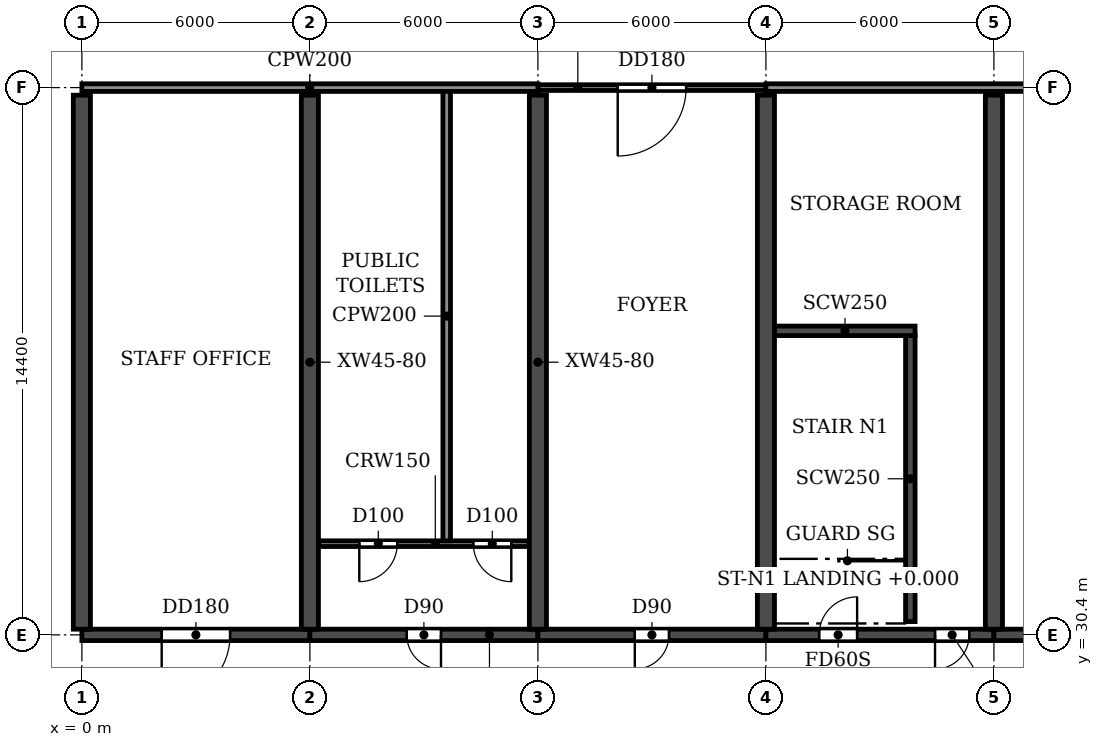
"""IFC4 building model, lengths in metres.
Left out: names, types, materials, properties, quantities, classifications, styles, units other than length and angle.
Written with IfcOpenShell. Run it as: python <this file> out.ifc"""

import sys

from ifc_helpers import new_model, si_unit, direction, frame, frame_2d, origin, place, context, subcontext, project, spatial, rectangle, extrude, element, fill, save


model = new_model("IFC4")
c1 = context("Model", 3, precision=1e-05, world=origin(), true_north=direction((0.0, 1.0)))
c2 = subcontext(c1, "Body", "Model", "MODEL_VIEW")
j1 = project(units=[si_unit("LENGTHUNIT", "METRE"), si_unit("PLANEANGLEUNIT", "RADIAN")], contexts=[c1])
p1 = place(None, origin())
s1 = spatial("IfcSite", under=j1, at=p1, CompositionType="ELEMENT")
p2 = place(p1, origin())
s2 = spatial("IfcBuilding", under=s1, at=p2, CompositionType="ELEMENT")
p3 = place(p2, frame((0.0, 0.0, 19.2)))
s3 = spatial("IfcBuildingStorey", under=s2, at=p3, CompositionType="ELEMENT", Elevation=19.2)
for number, where, z_axis, x_axis in (
    (1, (0.0, 30.55, 0.0), (0.0, 0.0, 1.0), (0.0, 1.0, 0.0)),
    (2, (6.0, 30.55, 0.0), (0.0, 0.0, 1.0), (0.0, 1.0, 0.0)),
    (3, (12.0, 30.55, 0.0), (0.0, 0.0, 1.0), (0.0, 1.0, 0.0)),
    (4, (18.0, 30.55, 0.0), (0.0, 0.0, 1.0), (0.0, 1.0, 0.0)),
    (5, (24.0, 30.55, 0.0), (0.0, 0.0, 1.0), (0.0, 1.0, 0.0)),
):
    element("IfcWall", number, at=place(p3, frame(where, z_axis=z_axis, x_axis=x_axis)), inside=s3, PredefinedType="SHEAR", context=c2, shape_type="SweptSolid", body=[
        extrude(rectangle(XDim=14.05, YDim=0.45, at=frame_2d((7.025, 0.0))), origin(), (0.0, 0.0, 1.0), 3.95),
    ])
p4 = place(p3, frame((0.0, 30.4, 0.0), z_axis=(0.0, 0.0, 1.0), x_axis=(1.0, 0.0, 0.0)))
e6 = element("IfcWall", 6, at=p4, inside=s3, PredefinedType="SHEAR", context=c2, shape_type="SweptSolid", body=[
    extrude(rectangle(XDim=6.0, YDim=0.3, at=frame_2d((3.0, 0.0))), origin(), (0.0, 0.0, 1.0), 3.35),
])
p5 = place(p4, frame((2.1, 0.0, 0.0)))
e7 = element("IfcOpeningElement", 7, at=p5, cuts=e6, PredefinedType="OPENING", context=c2, shape_type="SweptSolid", body=[
    extrude(rectangle(XDim=1.8, YDim=2.1, at=frame_2d((0.9, 1.05))), frame((0.0, 0.16, 0.0), z_axis=(0.0, -1.0, 0.0), x_axis=(1.0, 0.0, 0.0)), (0.0, 0.0, 1.0), 0.32),
])
p6 = place(p3, frame((6.0, 30.4, 0.0), z_axis=(0.0, 0.0, 1.0), x_axis=(1.0, 0.0, 0.0)))
e8 = element("IfcWall", 8, at=p6, inside=s3, PredefinedType="SHEAR", context=c2, shape_type="SweptSolid", body=[
    extrude(rectangle(XDim=6.0, YDim=0.3, at=frame_2d((3.0, 0.0))), origin(), (0.0, 0.0, 1.0), 3.35),
])
p7 = place(p6, frame((2.55, 0.0, 0.0)))
e9 = element("IfcOpeningElement", 9, at=p7, cuts=e8, PredefinedType="OPENING", context=c2, shape_type="SweptSolid", body=[
    extrude(rectangle(XDim=0.9, YDim=2.1, at=frame_2d((0.45, 1.05))), frame((0.0, 0.16, 0.0), z_axis=(0.0, -1.0, 0.0), x_axis=(1.0, 0.0, 0.0)), (0.0, 0.0, 1.0), 0.32),
])
p8 = place(p3, frame((12.0, 30.4, 0.0), z_axis=(0.0, 0.0, 1.0), x_axis=(1.0, 0.0, 0.0)))
e10 = element("IfcWall", 10, at=p8, inside=s3, PredefinedType="SHEAR", context=c2, shape_type="SweptSolid", body=[
    extrude(rectangle(XDim=6.0, YDim=0.3, at=frame_2d((3.0, 0.0))), origin(), (0.0, 0.0, 1.0), 3.35),
])
p9 = place(p8, frame((2.55, 0.0, 0.0)))
e11 = element("IfcOpeningElement", 11, at=p9, cuts=e10, PredefinedType="OPENING", context=c2, shape_type="SweptSolid", body=[
    extrude(rectangle(XDim=0.9, YDim=2.1, at=frame_2d((0.45, 1.05))), frame((0.0, 0.16, 0.0), z_axis=(0.0, -1.0, 0.0), x_axis=(1.0, 0.0, 0.0)), (0.0, 0.0, 1.0), 0.32),
])
p10 = place(p3, frame((18.0, 30.4, 0.0), z_axis=(0.0, 0.0, 1.0), x_axis=(1.0, 0.0, 0.0)))
e12 = element("IfcWall", 12, at=p10, inside=s3, PredefinedType="SHEAR", context=c2, shape_type="SweptSolid", body=[
    extrude(rectangle(XDim=6.0, YDim=0.3, at=frame_2d((3.0, 0.0))), origin(), (0.0, 0.0, 1.0), 3.35),
])
p11 = place(p10, frame((1.4, 0.0, 0.0)))
e13 = element("IfcOpeningElement", 13, at=p11, cuts=e12, PredefinedType="OPENING", context=c2, shape_type="SweptSolid", body=[
    extrude(rectangle(XDim=1.0, YDim=2.1, at=frame_2d((0.5, 1.05))), frame((0.0, 0.16, 0.0), z_axis=(0.0, -1.0, 0.0), x_axis=(1.0, 0.0, 0.0)), (0.0, 0.0, 1.0), 0.32),
])
p12 = place(p10, frame((4.45, 0.0, 0.0)))
e14 = element("IfcOpeningElement", 14, at=p12, cuts=e12, PredefinedType="OPENING", context=c2, shape_type="SweptSolid", body=[
    extrude(rectangle(XDim=0.9, YDim=2.1, at=frame_2d((0.45, 1.05))), frame((0.0, 0.16, 0.0), z_axis=(0.0, -1.0, 0.0), x_axis=(1.0, 0.0, 0.0)), (0.0, 0.0, 1.0), 0.32),
])
p13 = place(p3, frame((24.0, 30.4, 0.0), z_axis=(0.0, 0.0, 1.0), x_axis=(1.0, 0.0, 0.0)))
e15 = element("IfcWall", 15, at=p13, inside=s3, PredefinedType="SHEAR", context=c2, shape_type="SweptSolid", body=[
    extrude(rectangle(XDim=6.0, YDim=0.3, at=frame_2d((3.0, 0.0))), origin(), (0.0, 0.0, 1.0), 3.35),
])
p14 = place(p13, frame((2.55, 0.0, 0.0)))
e16 = element("IfcOpeningElement", 16, at=p14, cuts=e15, PredefinedType="OPENING", context=c2, shape_type="SweptSolid", body=[
    extrude(rectangle(XDim=0.9, YDim=2.1, at=frame_2d((0.45, 1.05))), frame((0.0, 0.16, 0.0), z_axis=(0.0, -1.0, 0.0), x_axis=(1.0, 0.0, 0.0)), (0.0, 0.0, 1.0), 0.32),
])
p15 = place(p3, frame((21.8, 30.75, 0.0), z_axis=(0.0, 0.0, 1.0), x_axis=(0.0, 1.0, 0.0)))
e17 = element("IfcWall", 17, at=p15, inside=s3, PredefinedType="SOLIDWALL", context=c2, shape_type="SweptSolid", body=[
    extrude(rectangle(XDim=7.525, YDim=0.25, at=frame_2d((3.762, 0.0))), origin(), (0.0, 0.0, 1.0), 3.95),
])
p16 = place(p3, frame((18.0, 38.4, 0.0), z_axis=(0.0, 0.0, 1.0), x_axis=(1.0, 0.0, 0.0)))
e18 = element("IfcWall", 18, at=p16, inside=s3, PredefinedType="SOLIDWALL", context=c2, shape_type="SweptSolid", body=[
    extrude(rectangle(XDim=3.925, YDim=0.25, at=frame_2d((1.962, 0.0))), origin(), (0.0, 0.0, 1.0), 3.95),
])
p17 = place(p3, frame((6.235, 32.8, 0.0), z_axis=(0.0, 0.0, 1.0), x_axis=(1.0, 0.0, 0.0)))
e19 = element("IfcWall", 19, at=p17, inside=s3, PredefinedType="PARTITIONING", context=c2, shape_type="SweptSolid", body=[
    extrude(rectangle(XDim=5.53, YDim=0.15, at=frame_2d((2.765, 0.0))), origin(), (0.0, 0.0, 1.0), 3.95),
])
p18 = place(p17, frame((1.065, 0.0, 0.0)))
e20 = element("IfcOpeningElement", 20, at=p18, cuts=e19, PredefinedType="OPENING", context=c2, shape_type="SweptSolid", body=[
    extrude(rectangle(XDim=1.0, YDim=2.1, at=frame_2d((0.5, 1.05))), frame((0.0, 0.085, 0.0), z_axis=(0.0, -1.0, 0.0), x_axis=(1.0, 0.0, 0.0)), (0.0, 0.0, 1.0), 0.17),
])
p19 = place(p17, frame((4.065, 0.0, 0.0)))
e21 = element("IfcOpeningElement", 21, at=p19, cuts=e19, PredefinedType="OPENING", context=c2, shape_type="SweptSolid", body=[
    extrude(rectangle(XDim=1.0, YDim=2.1, at=frame_2d((0.5, 1.05))), frame((0.0, 0.085, 0.0), z_axis=(0.0, -1.0, 0.0), x_axis=(1.0, 0.0, 0.0)), (0.0, 0.0, 1.0), 0.17),
])
p20 = place(p3, frame((12.0, 44.8, 0.0), z_axis=(0.0, 0.0, 1.0), x_axis=(1.0, 0.0, 0.0)))
e22 = element("IfcWall", 22, at=p20, inside=s3, PredefinedType="PARTITIONING", context=c2, shape_type="SweptSolid", body=[
    extrude(rectangle(XDim=6.0, YDim=0.15, at=frame_2d((3.0, 0.0))), origin(), (0.0, 0.0, 1.0), 3.95),
])
p21 = place(p20, frame((2.1, 0.0, 0.0)))
e23 = element("IfcOpeningElement", 23, at=p21, cuts=e22, PredefinedType="OPENING", context=c2, shape_type="SweptSolid", body=[
    extrude(rectangle(XDim=1.8, YDim=2.1, at=frame_2d((0.9, 1.05))), frame((0.0, 0.085, 0.0), z_axis=(0.0, -1.0, 0.0), x_axis=(1.0, 0.0, 0.0)), (0.0, 0.0, 1.0), 0.17),
])
p22 = place(p3, frame((0.0, 44.8, 0.0), z_axis=(0.0, 0.0, 1.0), x_axis=(1.0, 0.0, 0.0)))
e24 = element("IfcWall", 24, at=p22, inside=s3, PredefinedType="PARTITIONING", context=c2, shape_type="SweptSolid", body=[
    extrude(rectangle(XDim=12.0, YDim=0.2, at=frame_2d((6.0, 0.0))), origin(), (0.0, 0.0, 1.0), 3.95),
])
p23 = place(p3, frame((18.0, 44.8, 0.0), z_axis=(0.0, 0.0, 1.0), x_axis=(1.0, 0.0, 0.0)))
e25 = element("IfcWall", 25, at=p23, inside=s3, PredefinedType="PARTITIONING", context=c2, shape_type="SweptSolid", body=[
    extrude(rectangle(XDim=30.0, YDim=0.2, at=frame_2d((15.0, 0.0))), origin(), (0.0, 0.0, 1.0), 3.95),
])
p24 = place(p3, frame((9.6, 32.875, 0.0), z_axis=(0.0, 0.0, 1.0), x_axis=(0.0, 1.0, 0.0)))
e26 = element("IfcWall", 26, at=p24, inside=s3, PredefinedType="PARTITIONING", context=c2, shape_type="SweptSolid", body=[
    extrude(rectangle(XDim=11.825, YDim=0.2, at=frame_2d((5.913, 0.0))), origin(), (0.0, 0.0, 1.0), 3.95),
])
p25 = place(p5, frame((1.8, 0.0, 0.0), z_axis=(0.0, 0.0, 1.0), x_axis=(-1.0, 0.0, 0.0)))
e27 = element("IfcDoor", 27, at=p25, inside=s3, OperationType="DOUBLE_DOOR_SINGLE_SWING", PredefinedType="DOOR", context=c2, shape_type="SweptSolid", body=[
    extrude(rectangle(XDim=1.8, YDim=2.1, at=frame_2d((0.9, 1.05))), frame((0.0, 0.025, 0.0), z_axis=(0.0, -1.0, 0.0), x_axis=(1.0, 0.0, 0.0)), (0.0, 0.0, 1.0), 0.05),
])
fill(e7, e27)
p26 = place(p7, frame((0.9, 0.0, 0.0), z_axis=(0.0, 0.0, 1.0), x_axis=(-1.0, 0.0, 0.0)))
e28 = element("IfcDoor", 28, at=p26, inside=s3, OperationType="SINGLE_SWING_LEFT", PredefinedType="DOOR", context=c2, shape_type="SweptSolid", body=[
    extrude(rectangle(XDim=0.9, YDim=2.1, at=frame_2d((0.45, 1.05))), frame((0.0, 0.025, 0.0), z_axis=(0.0, -1.0, 0.0), x_axis=(1.0, 0.0, 0.0)), (0.0, 0.0, 1.0), 0.05),
])
fill(e9, e28)
p27 = place(p9, frame((0.9, 0.0, 0.0), z_axis=(0.0, 0.0, 1.0), x_axis=(-1.0, 0.0, 0.0)))
e29 = element("IfcDoor", 29, at=p27, inside=s3, OperationType="SINGLE_SWING_RIGHT", PredefinedType="DOOR", context=c2, shape_type="SweptSolid", body=[
    extrude(rectangle(XDim=0.9, YDim=2.1, at=frame_2d((0.45, 1.05))), frame((0.0, 0.025, 0.0), z_axis=(0.0, -1.0, 0.0), x_axis=(1.0, 0.0, 0.0)), (0.0, 0.0, 1.0), 0.05),
])
fill(e11, e29)
p28 = place(p11, origin())
e30 = element("IfcDoor", 30, at=p28, inside=s3, OperationType="SINGLE_SWING_RIGHT", PredefinedType="DOOR", context=c2, shape_type="SweptSolid", body=[
    extrude(rectangle(XDim=1.0, YDim=2.1, at=frame_2d((0.5, 1.05))), frame((0.0, 0.025, 0.0), z_axis=(0.0, -1.0, 0.0), x_axis=(1.0, 0.0, 0.0)), (0.0, 0.0, 1.0), 0.05),
])
fill(e13, e30)
p29 = place(p12, frame((0.9, 0.0, 0.0), z_axis=(0.0, 0.0, 1.0), x_axis=(-1.0, 0.0, 0.0)))
e31 = element("IfcDoor", 31, at=p29, inside=s3, OperationType="SINGLE_SWING_RIGHT", PredefinedType="DOOR", context=c2, shape_type="SweptSolid", body=[
    extrude(rectangle(XDim=0.9, YDim=2.1, at=frame_2d((0.45, 1.05))), frame((0.0, 0.025, 0.0), z_axis=(0.0, -1.0, 0.0), x_axis=(1.0, 0.0, 0.0)), (0.0, 0.0, 1.0), 0.05),
])
fill(e14, e31)
p30 = place(p18, frame((1.0, 0.0, 0.0), z_axis=(0.0, 0.0, 1.0), x_axis=(-1.0, 0.0, 0.0)))
e32 = element("IfcDoor", 32, at=p30, inside=s3, OperationType="SINGLE_SWING_RIGHT", PredefinedType="DOOR", context=c2, shape_type="SweptSolid", body=[
    extrude(rectangle(XDim=1.0, YDim=2.1, at=frame_2d((0.5, 1.05))), frame((0.0, 0.025, 0.0), z_axis=(0.0, -1.0, 0.0), x_axis=(1.0, 0.0, 0.0)), (0.0, 0.0, 1.0), 0.05),
])
fill(e20, e32)
p31 = place(p19, frame((1.0, 0.0, 0.0), z_axis=(0.0, 0.0, 1.0), x_axis=(-1.0, 0.0, 0.0)))
e33 = element("IfcDoor", 33, at=p31, inside=s3, OperationType="SINGLE_SWING_LEFT", PredefinedType="DOOR", context=c2, shape_type="SweptSolid", body=[
    extrude(rectangle(XDim=1.0, YDim=2.1, at=frame_2d((0.5, 1.05))), frame((0.0, 0.025, 0.0), z_axis=(0.0, -1.0, 0.0), x_axis=(1.0, 0.0, 0.0)), (0.0, 0.0, 1.0), 0.05),
])
fill(e21, e33)
p32 = place(p21, frame((1.8, 0.0, 0.0), z_axis=(0.0, 0.0, 1.0), x_axis=(-1.0, 0.0, 0.0)))
e34 = element("IfcDoor", 34, at=p32, inside=s3, OperationType="DOUBLE_DOOR_SINGLE_SWING", PredefinedType="DOOR", context=c2, shape_type="SweptSolid", body=[
    extrude(rectangle(XDim=1.8, YDim=2.1, at=frame_2d((0.9, 1.05))), frame((0.0, 0.025, 0.0), z_axis=(0.0, -1.0, 0.0), x_axis=(1.0, 0.0, 0.0)), (0.0, 0.0, 1.0), 0.05),
])
fill(e23, e34)
save(model, sys.argv[1])
